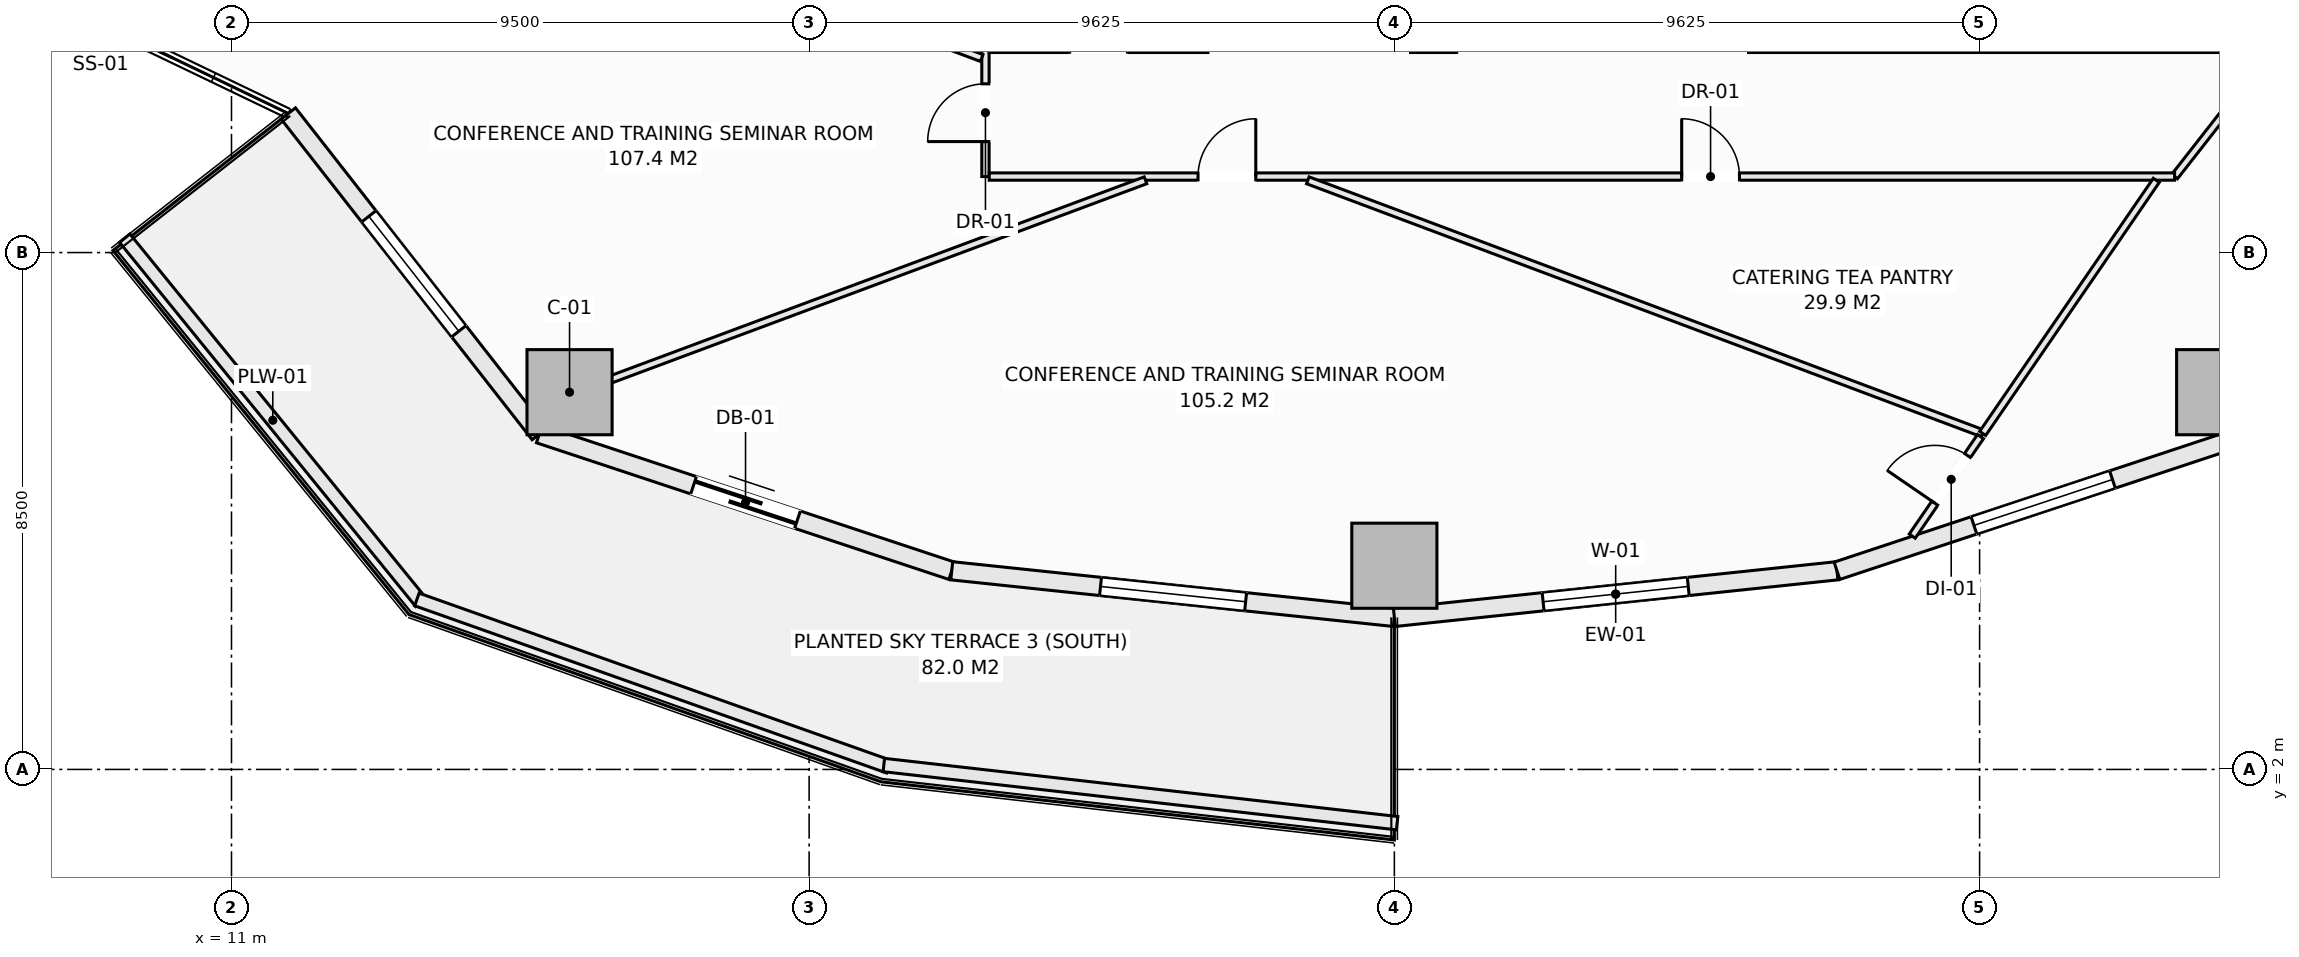
"""IFC4 building model, lengths in metres.
Left out: names, types, materials, properties, quantities, classifications, styles, units other than length and angle.
Written with IfcOpenShell. Run it as: python <this file> out.ifc"""

import sys

from ifc_helpers import new_model, si_unit, direction, frame, frame_2d, origin, origin_2d, place, context, subcontext, project, spatial, rectangle, extrude, element, fill, save


model = new_model("IFC4")
c1 = context("Model", 3, precision=1e-05, world=origin(), true_north=direction((0.0, 1.0)))
c2 = subcontext(c1, "Body", "Model", "MODEL_VIEW")
j1 = project(units=[si_unit("LENGTHUNIT", "METRE"), si_unit("PLANEANGLEUNIT", "RADIAN")], contexts=[c1])
p1 = place(None, origin())
s1 = spatial("IfcSite", under=j1, at=p1, CompositionType="ELEMENT")
p2 = place(p1, origin())
s2 = spatial("IfcBuilding", under=s1, at=p2, CompositionType="ELEMENT")
p3 = place(p2, frame((0.0, 0.0, 38.05)))
s3 = spatial("IfcBuildingStorey", under=s2, at=p3, CompositionType="ELEMENT", Elevation=38.05)
for number, where, z_axis, x_axis in (
    (1, (16.56, 8.204, -0.28), (0.0, 0.0, 1.0), (1.0, 0.0, 0.0)),
    (2, (30.125, 5.35, -0.28), (0.0, 0.0, 1.0), (1.0, 0.0, 0.0)),
    (3, (43.69, 8.204, -0.28), (0.0, 0.0, 1.0), (1.0, 0.0, 0.0)),
):
    element("IfcColumn", number, at=place(p3, frame(where, z_axis=z_axis, x_axis=x_axis)), inside=s3, PredefinedType="COLUMN", context=c2, shape_type="SweptSolid", body=[
        extrude(rectangle(XDim=1.4, YDim=1.4, at=origin_2d()), origin(), (0.0, 0.0, 1.0), 3.85),
    ])
p4 = place(p3, frame((11.935, 12.787, 0.0), z_axis=(0.0, 0.0, 1.0), x_axis=(0.616421309777, -0.787416515482, 0.0)))
e4 = element("IfcWall", 4, at=p4, inside=s3, PredefinedType="SOLIDWALL", context=c2, shape_type="SweptSolid", body=[
    extrude(rectangle(XDim=6.696, YDim=0.3, at=frame_2d((3.348, 0.0))), origin(), (0.0, 0.0, 1.0), 3.093),
])
p5 = place(p4, frame((2.148, 0.0, 0.85)))
e5 = element("IfcOpeningElement", 5, at=p5, cuts=e4, PredefinedType="OPENING", context=c2, shape_type="SweptSolid", body=[
    extrude(rectangle(XDim=2.4, YDim=1.9, at=frame_2d((1.2, 0.95))), frame((0.0, 0.16, 0.0), z_axis=(0.0, -1.0, 0.0), x_axis=(1.0, 0.0, 0.0)), (0.0, 0.0, 1.0), 0.32),
])
p6 = place(p3, frame((16.062, 7.514, 0.0), z_axis=(0.0, 0.0, 1.0), x_axis=(0.949238715533, -0.31455661006, 0.0)))
e6 = element("IfcWall", 6, at=p6, inside=s3, PredefinedType="SOLIDWALL", context=c2, shape_type="SweptSolid", body=[
    extrude(rectangle(XDim=7.146, YDim=0.3, at=frame_2d((3.573, 0.0))), origin(), (0.0, 0.0, 1.0), 3.093),
])
p7 = place(p6, frame((2.673, 0.0, 0.0)))
e7 = element("IfcOpeningElement", 7, at=p7, cuts=e6, PredefinedType="OPENING", context=c2, shape_type="SweptSolid", body=[
    extrude(rectangle(XDim=1.8, YDim=2.25, at=frame_2d((0.9, 1.125))), frame((0.0, 0.16, 0.0), z_axis=(0.0, -1.0, 0.0), x_axis=(1.0, 0.0, 0.0)), (0.0, 0.0, 1.0), 0.32),
])
p8 = place(p3, frame((22.846, 5.267, 0.0), z_axis=(0.0, 0.0, 1.0), x_axis=(0.994500334317, -0.104733399844, 0.0)))
e8 = element("IfcWall", 8, at=p8, inside=s3, PredefinedType="SOLIDWALL", context=c2, shape_type="SweptSolid", body=[
    extrude(rectangle(XDim=7.32, YDim=0.3, at=frame_2d((3.66, 0.0))), origin(), (0.0, 0.0, 1.0), 3.093),
])
p9 = place(p8, frame((2.46, 0.0, 0.85)))
e9 = element("IfcOpeningElement", 9, at=p9, cuts=e8, PredefinedType="OPENING", context=c2, shape_type="SweptSolid", body=[
    extrude(rectangle(XDim=2.4, YDim=1.9, at=frame_2d((1.2, 0.95))), frame((0.0, 0.16, 0.0), z_axis=(0.0, -1.0, 0.0), x_axis=(1.0, 0.0, 0.0)), (0.0, 0.0, 1.0), 0.32),
])
p10 = place(p3, frame((30.125, 4.5, 0.0), z_axis=(0.0, 0.0, 1.0), x_axis=(0.994500334317, 0.104733399844, 0.0)))
e10 = element("IfcWall", 10, at=p10, inside=s3, PredefinedType="SOLIDWALL", context=c2, shape_type="SweptSolid", body=[
    extrude(rectangle(XDim=7.32, YDim=0.3, at=frame_2d((3.66, 0.0))), origin(), (0.0, 0.0, 1.0), 3.093),
])
p11 = place(p10, frame((2.46, 0.0, 0.85)))
e11 = element("IfcOpeningElement", 11, at=p11, cuts=e10, PredefinedType="OPENING", context=c2, shape_type="SweptSolid", body=[
    extrude(rectangle(XDim=2.4, YDim=1.9, at=frame_2d((1.2, 0.95))), frame((0.0, 0.16, 0.0), z_axis=(0.0, -1.0, 0.0), x_axis=(1.0, 0.0, 0.0)), (0.0, 0.0, 1.0), 0.32),
])
p12 = place(p3, frame((37.404, 5.267, 0.0), z_axis=(0.0, 0.0, 1.0), x_axis=(0.949238715533, 0.31455661006, 0.0)))
e12 = element("IfcWall", 12, at=p12, inside=s3, PredefinedType="SOLIDWALL", context=c2, shape_type="SweptSolid", body=[
    extrude(rectangle(XDim=7.146, YDim=0.3, at=frame_2d((3.573, 0.0))), origin(), (0.0, 0.0, 1.0), 3.093),
])
p13 = place(p12, frame((2.373, 0.0, 0.85)))
e13 = element("IfcOpeningElement", 13, at=p13, cuts=e12, PredefinedType="OPENING", context=c2, shape_type="SweptSolid", body=[
    extrude(rectangle(XDim=2.4, YDim=1.9, at=frame_2d((1.2, 0.95))), frame((0.0, 0.16, 0.0), z_axis=(0.0, -1.0, 0.0), x_axis=(1.0, 0.0, 0.0)), (0.0, 0.0, 1.0), 0.32),
])
p14 = place(p3, frame((9.244, 10.736, 0.0), z_axis=(0.0, 0.0, 1.0), x_axis=(0.630997450658, -0.775784903993, 0.0)))
e14 = element("IfcWall", 14, at=p14, inside=s3, PredefinedType="PARAPET", context=c2, shape_type="SweptSolid", body=[
    extrude(rectangle(XDim=7.718, YDim=0.22, at=frame_2d((3.859, 0.0))), origin(), (0.0, 0.0, 1.0), 0.52),
])
p15 = place(p3, frame((14.049, 4.795, 0.0), z_axis=(0.0, 0.0, 1.0), x_axis=(0.942581348797, -0.333976647237, 0.0)))
e15 = element("IfcWall", 15, at=p15, inside=s3, PredefinedType="PARAPET", context=c2, shape_type="SweptSolid", body=[
    extrude(rectangle(XDim=8.236, YDim=0.22, at=frame_2d((4.118, 0.0))), origin(), (0.0, 0.0, 1.0), 0.52),
])
p16 = place(p3, frame((21.729, 2.073, 0.0), z_axis=(0.0, 0.0, 1.0), x_axis=(0.993644541351, -0.112563428535, 0.0)))
e16 = element("IfcWall", 16, at=p16, inside=s3, PredefinedType="PARAPET", context=c2, shape_type="SweptSolid", body=[
    extrude(rectangle(XDim=8.496, YDim=0.22, at=frame_2d((4.248, 0.0))), origin(), (0.0, 0.0, 1.0), 0.52),
])
p17 = place(p3, frame((23.4, 11.75, 0.0), z_axis=(0.0, 0.0, 1.0), x_axis=(0.0, 1.0, 0.0)))
e17 = element("IfcWall", 17, at=p17, inside=s3, PredefinedType="PARTITIONING", context=c2, shape_type="SweptSolid", body=[
    extrude(rectangle(XDim=2.1, YDim=0.12, at=frame_2d((1.05, 0.0))), origin(), (0.0, 0.0, 1.0), 3.57),
])
p18 = place(p17, frame((0.575, 0.0, 0.0)))
e18 = element("IfcOpeningElement", 18, at=p18, cuts=e17, PredefinedType="OPENING", context=c2, shape_type="SweptSolid", body=[
    extrude(rectangle(XDim=0.95, YDim=2.1, at=frame_2d((0.475, 1.05))), frame((0.0, 0.07, 0.0), z_axis=(0.0, -1.0, 0.0), x_axis=(1.0, 0.0, 0.0)), (0.0, 0.0, 1.0), 0.14),
])
p19 = place(p3, frame((42.957, 11.75, 0.0), z_axis=(0.0, 0.0, 1.0), x_axis=(0.616428289415, 0.78741105149, 0.0)))
e19 = element("IfcWall", 19, at=p19, inside=s3, PredefinedType="PARTITIONING", context=c2, shape_type="SweptSolid", body=[
    extrude(rectangle(XDim=5.375, YDim=0.12, at=frame_2d((2.687, 0.0))), origin(), (0.0, 0.0, 1.0), 3.57),
])
p20 = place(p3, frame((23.462, 11.75, 0.0), z_axis=(0.0, 0.0, 1.0), x_axis=(1.0, 0.0, 0.0)))
e20 = element("IfcWall", 20, at=p20, inside=s3, PredefinedType="PARTITIONING", context=c2, shape_type="SweptSolid", body=[
    extrude(rectangle(XDim=19.495, YDim=0.12, at=frame_2d((9.748, 0.0))), origin(), (0.0, 0.0, 1.0), 3.57),
])
p21 = place(p20, frame((3.434, 0.0, 0.0)))
e21 = element("IfcOpeningElement", 21, at=p21, cuts=e20, PredefinedType="OPENING", context=c2, shape_type="SweptSolid", body=[
    extrude(rectangle(XDim=0.95, YDim=2.1, at=frame_2d((0.475, 1.05))), frame((0.0, 0.07, 0.0), z_axis=(0.0, -1.0, 0.0), x_axis=(1.0, 0.0, 0.0)), (0.0, 0.0, 1.0), 0.14),
])
p22 = place(p20, frame((11.388, 0.0, 0.0)))
e22 = element("IfcOpeningElement", 22, at=p22, cuts=e20, PredefinedType="OPENING", context=c2, shape_type="SweptSolid", body=[
    extrude(rectangle(XDim=0.95, YDim=2.1, at=frame_2d((0.475, 1.05))), frame((0.0, 0.07, 0.0), z_axis=(0.0, -1.0, 0.0), x_axis=(1.0, 0.0, 0.0)), (0.0, 0.0, 1.0), 0.14),
])
p23 = place(p3, frame((3.094, 21.29, 0.0), z_axis=(0.0, 0.0, 1.0), x_axis=(0.936344026666, -0.35108384145, 0.0)))
e23 = element("IfcWall", 23, at=p23, inside=s3, PredefinedType="PARTITIONING", context=c2, shape_type="SweptSolid", body=[
    extrude(rectangle(XDim=21.62, YDim=0.12, at=frame_2d((10.81, 0.0))), origin(), (0.0, 0.0, 1.0), 3.57),
])
p24 = place(p3, frame((28.702, 11.688, 0.0), z_axis=(0.0, 0.0, 1.0), x_axis=(0.936344412232, -0.351082813139, 0.0)))
e24 = element("IfcWall", 24, at=p24, inside=s3, PredefinedType="PARTITIONING", context=c2, shape_type="SweptSolid", body=[
    extrude(rectangle(XDim=11.854, YDim=0.12, at=frame_2d((5.927, 0.0))), origin(), (0.0, 0.0, 1.0), 3.093),
])
p25 = place(p3, frame((15.932, 7.927, 0.0), z_axis=(0.0, 0.0, 1.0), x_axis=(0.937141242974, 0.348950269689, 0.0)))
e25 = element("IfcWall", 25, at=p25, inside=s3, PredefinedType="PARTITIONING", context=c2, shape_type="SweptSolid", body=[
    extrude(rectangle(XDim=10.777, YDim=0.12, at=frame_2d((5.389, 0.0))), origin(), (0.0, 0.0, 1.0), 2.934),
])
p26 = place(p3, frame((38.642, 5.837, 0.0), z_axis=(0.0, 0.0, 1.0), x_axis=(0.565776914944, 0.82455835604, 0.0)))
e26 = element("IfcWall", 26, at=p26, inside=s3, PredefinedType="PARTITIONING", context=c2, shape_type="SweptSolid", body=[
    extrude(rectangle(XDim=1.985, YDim=0.12, at=frame_2d((0.992, 0.0))), origin(), (0.0, 0.0, 1.0), 3.57),
])
p27 = place(p26, frame((0.657, 0.0, 0.0)))
e27 = element("IfcOpeningElement", 27, at=p27, cuts=e26, PredefinedType="OPENING", context=c2, shape_type="SweptSolid", body=[
    extrude(rectangle(XDim=0.95, YDim=2.1, at=frame_2d((0.475, 1.05))), frame((0.0, 0.07, 0.0), z_axis=(0.0, -1.0, 0.0), x_axis=(1.0, 0.0, 0.0)), (0.0, 0.0, 1.0), 0.14),
])
p28 = place(p3, frame((39.801, 7.526, 0.0), z_axis=(0.0, 0.0, 1.0), x_axis=(0.565756744253, 0.824572195949, 0.0)))
e28 = element("IfcWall", 28, at=p28, inside=s3, PredefinedType="PARTITIONING", context=c2, shape_type="SweptSolid", body=[
    extrude(rectangle(XDim=5.048, YDim=0.12, at=frame_2d((2.524, 0.0))), origin(), (0.0, 0.0, 1.0), 3.57),
])
p29 = place(p5, origin())
e29 = element("IfcWindow", 29, at=p29, inside=s3, PartitioningType="SINGLE_PANEL", PredefinedType="WINDOW", context=c2, shape_type="SweptSolid", body=[
    extrude(rectangle(XDim=2.4, YDim=1.9, at=frame_2d((1.2, 0.95))), frame((0.0, 0.03, 0.0), z_axis=(0.0, -1.0, 0.0), x_axis=(1.0, 0.0, 0.0)), (0.0, 0.0, 1.0), 0.06),
])
fill(e5, e29)
p30 = place(p7, frame((1.8, 0.0, 0.0), z_axis=(0.0, 0.0, 1.0), x_axis=(-1.0, 0.0, 0.0)))
e30 = element("IfcDoor", 30, at=p30, inside=s3, OperationType="SLIDING_TO_LEFT", PredefinedType="DOOR", context=c2, shape_type="SweptSolid", body=[
    extrude(rectangle(XDim=1.8, YDim=2.25, at=frame_2d((0.9, 1.125))), frame((0.0, 0.025, 0.0), z_axis=(0.0, -1.0, 0.0), x_axis=(1.0, 0.0, 0.0)), (0.0, 0.0, 1.0), 0.05),
])
fill(e7, e30)
p31 = place(p9, origin())
e31 = element("IfcWindow", 31, at=p31, inside=s3, PartitioningType="SINGLE_PANEL", PredefinedType="WINDOW", context=c2, shape_type="SweptSolid", body=[
    extrude(rectangle(XDim=2.4, YDim=1.9, at=frame_2d((1.2, 0.95))), frame((0.0, 0.03, 0.0), z_axis=(0.0, -1.0, 0.0), x_axis=(1.0, 0.0, 0.0)), (0.0, 0.0, 1.0), 0.06),
])
fill(e9, e31)
p32 = place(p11, origin())
e32 = element("IfcWindow", 32, at=p32, inside=s3, PartitioningType="SINGLE_PANEL", PredefinedType="WINDOW", context=c2, shape_type="SweptSolid", body=[
    extrude(rectangle(XDim=2.4, YDim=1.9, at=frame_2d((1.2, 0.95))), frame((0.0, 0.03, 0.0), z_axis=(0.0, -1.0, 0.0), x_axis=(1.0, 0.0, 0.0)), (0.0, 0.0, 1.0), 0.06),
])
fill(e11, e32)
p33 = place(p13, origin())
e33 = element("IfcWindow", 33, at=p33, inside=s3, PartitioningType="SINGLE_PANEL", PredefinedType="WINDOW", context=c2, shape_type="SweptSolid", body=[
    extrude(rectangle(XDim=2.4, YDim=1.9, at=frame_2d((1.2, 0.95))), frame((0.0, 0.03, 0.0), z_axis=(0.0, -1.0, 0.0), x_axis=(1.0, 0.0, 0.0)), (0.0, 0.0, 1.0), 0.06),
])
fill(e13, e33)
p34 = place(p18, origin())
e34 = element("IfcDoor", 34, at=p34, inside=s3, OperationType="SINGLE_SWING_LEFT", PredefinedType="DOOR", context=c2, shape_type="SweptSolid", body=[
    extrude(rectangle(XDim=0.95, YDim=2.1, at=frame_2d((0.475, 1.05))), frame((0.0, 0.025, 0.0), z_axis=(0.0, -1.0, 0.0), x_axis=(1.0, 0.0, 0.0)), (0.0, 0.0, 1.0), 0.05),
])
fill(e18, e34)
p35 = place(p21, origin())
e35 = element("IfcDoor", 35, at=p35, inside=s3, OperationType="SINGLE_SWING_RIGHT", PredefinedType="DOOR", context=c2, shape_type="SweptSolid", body=[
    extrude(rectangle(XDim=0.95, YDim=2.1, at=frame_2d((0.475, 1.05))), frame((0.0, 0.025, 0.0), z_axis=(0.0, -1.0, 0.0), x_axis=(1.0, 0.0, 0.0)), (0.0, 0.0, 1.0), 0.05),
])
fill(e21, e35)
p36 = place(p22, origin())
e36 = element("IfcDoor", 36, at=p36, inside=s3, OperationType="SINGLE_SWING_LEFT", PredefinedType="DOOR", context=c2, shape_type="SweptSolid", body=[
    extrude(rectangle(XDim=0.95, YDim=2.1, at=frame_2d((0.475, 1.05))), frame((0.0, 0.025, 0.0), z_axis=(0.0, -1.0, 0.0), x_axis=(1.0, 0.0, 0.0)), (0.0, 0.0, 1.0), 0.05),
])
fill(e22, e36)
p37 = place(p27, origin())
e37 = element("IfcDoor", 37, at=p37, inside=s3, OperationType="SINGLE_SWING_LEFT", PredefinedType="DOOR", context=c2, shape_type="SweptSolid", body=[
    extrude(rectangle(XDim=0.95, YDim=2.1, at=frame_2d((0.475, 1.05))), frame((0.0, 0.025, 0.0), z_axis=(0.0, -1.0, 0.0), x_axis=(1.0, 0.0, 0.0)), (0.0, 0.0, 1.0), 0.05),
])
fill(e27, e37)
save(model, sys.argv[1])
